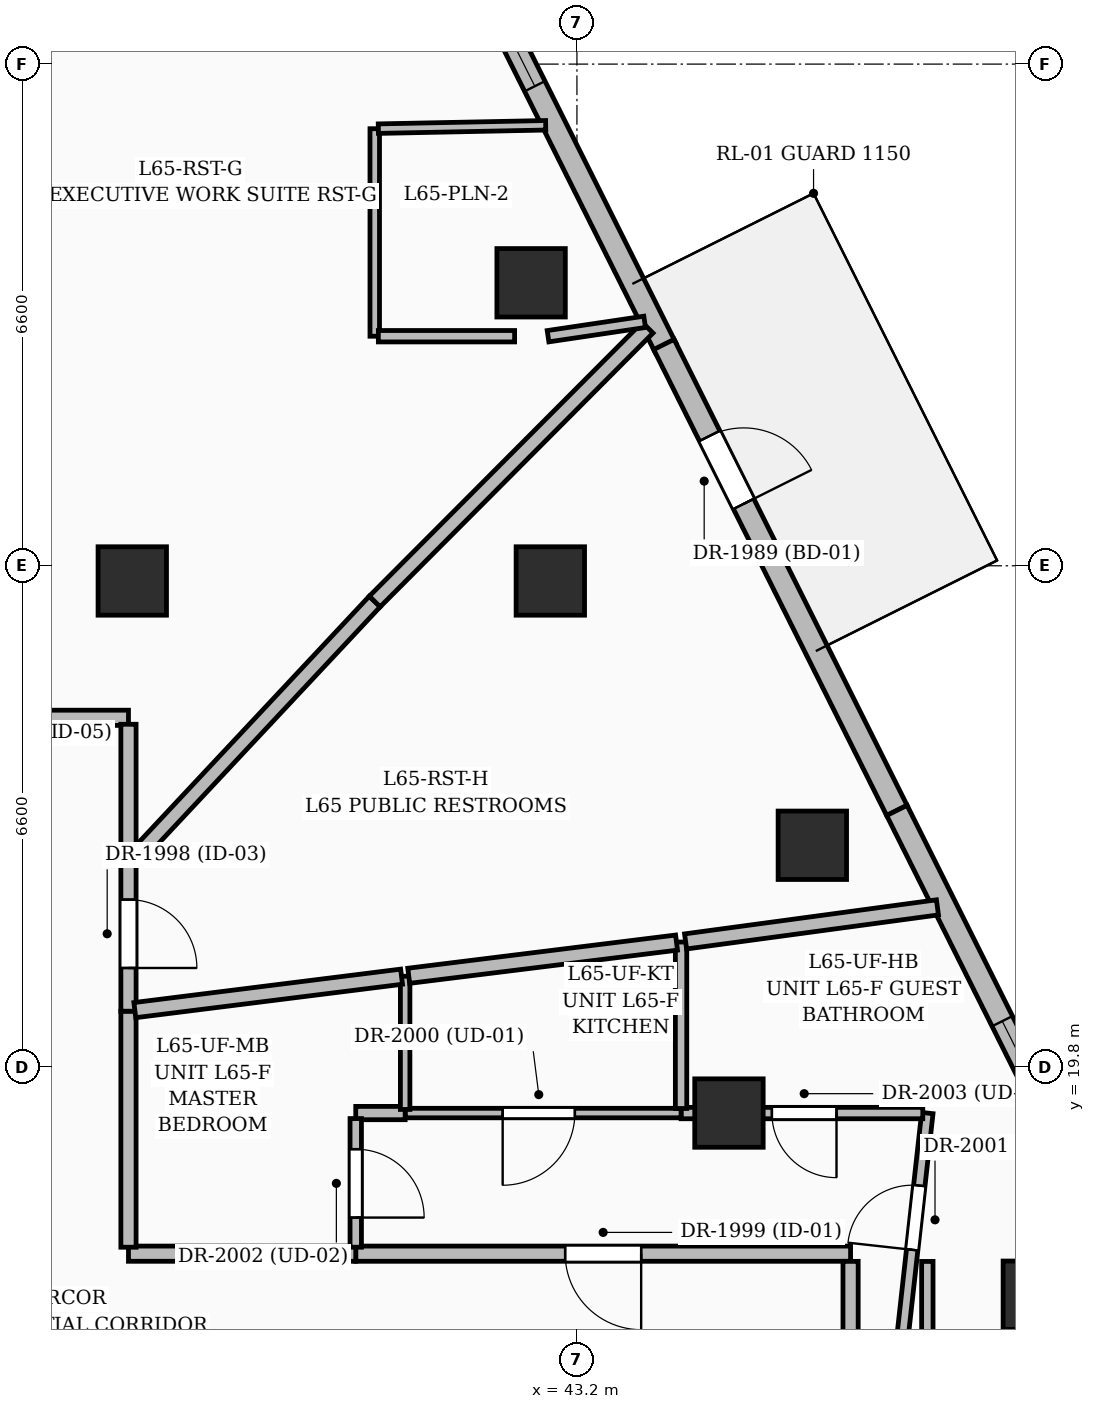
"""IFC4 building model, lengths in metres.
Left out: names, types, materials, properties, quantities, classifications, styles, units other than length and angle.
Written with IfcOpenShell. Run it as: python <this file> out.ifc"""

import sys

from ifc_helpers import new_model, si_unit, direction, frame, frame_2d, origin, origin_2d, place, context, subcontext, project, spatial, rectangle, extrude, element, fill, save


model = new_model("IFC4")
c1 = context("Model", 3, precision=1e-05, world=origin(), true_north=direction((0.0, 1.0)))
c2 = subcontext(c1, "Body", "Model", "MODEL_VIEW")
j1 = project(units=[si_unit("LENGTHUNIT", "METRE"), si_unit("PLANEANGLEUNIT", "RADIAN")], contexts=[c1])
p1 = place(None, origin())
s1 = spatial("IfcSite", under=j1, at=p1, CompositionType="ELEMENT")
p2 = place(p1, origin())
s2 = spatial("IfcBuilding", under=s1, at=p2, CompositionType="ELEMENT")
p3 = place(p2, frame((0.0, 0.0, 252.0)))
s3 = spatial("IfcBuildingStorey", under=s2, at=p3, CompositionType="ELEMENT", Elevation=252.0)
for number, where, z_axis, x_axis in (
    (1, (45.2, 19.2, 0.0), (0.0, 0.0, 1.0), (1.0, 0.0, 0.0)),
    (2, (42.85, 26.2, 0.0), (0.0, 0.0, 1.0), (1.0, 0.0, 0.0)),
    (3, (37.35, 26.2, 0.0), (0.0, 0.0, 1.0), (1.0, 0.0, 0.0)),
    (4, (49.257, 16.803, 0.0), (0.0, 0.0, 1.0), (1.0, 0.0, 0.0)),
    (5, (46.297, 22.723, 0.0), (0.0, 0.0, 1.0), (1.0, 0.0, 0.0)),
    (6, (42.597, 30.123, 0.0), (0.0, 0.0, 1.0), (1.0, 0.0, 0.0)),
):
    element("IfcColumn", number, at=place(p3, frame(where, z_axis=z_axis, x_axis=x_axis)), inside=s3, PredefinedType="COLUMN", context=c2, shape_type="SweptSolid", body=[
        extrude(rectangle(XDim=0.9, YDim=0.9, at=origin_2d()), origin(), (0.0, 0.0, 1.0), 3.75),
    ])
p4 = place(p3, frame((34.502, 31.101, 0.0), z_axis=(0.0, 0.0, 1.0), x_axis=(0.552157372899, 0.833739908816, 0.0)))
e7 = element("IfcWall", 7, at=p4, inside=s3, PredefinedType="SOLIDWALL", context=c2, shape_type="SweptSolid", body=[
    extrude(rectangle(XDim=5.234, YDim=0.3, at=frame_2d((2.617, 0.0))), origin(), (0.0, 0.0, 1.0), 3.5),
])
p5 = place(p4, frame((1.25, 0.0, 0.6)))
e8 = element("IfcOpeningElement", 8, at=p5, cuts=e7, PredefinedType="OPENING", context=c2, shape_type="SweptSolid", body=[
    extrude(rectangle(XDim=1.8, YDim=2.1, at=frame_2d((0.9, 1.05))), frame((0.0, 0.16, 0.0), z_axis=(0.0, -1.0, 0.0), x_axis=(1.0, 0.0, 0.0)), (0.0, 0.0, 1.0), 0.32),
])
p6 = place(p3, frame((41.588, 34.824, 0.0), z_axis=(0.0, 0.0, 1.0), x_axis=(0.447245016671, -0.894411479725, 0.0)))
e9 = element("IfcWall", 9, at=p6, inside=s3, PredefinedType="SOLIDWALL", context=c2, shape_type="SweptSolid", body=[
    extrude(rectangle(XDim=6.216, YDim=0.3, at=frame_2d((3.108, 0.0))), origin(), (0.0, 0.0, 1.0), 3.5),
])
p7 = place(p6, frame((0.765, 0.0, 0.55)))
e10 = element("IfcOpeningElement", 10, at=p7, cuts=e9, PredefinedType="OPENING", context=c2, shape_type="SweptSolid", body=[
    extrude(rectangle(XDim=1.6, YDim=2.2, at=frame_2d((0.8, 1.1))), frame((0.0, 0.16, 0.0), z_axis=(0.0, -1.0, 0.0), x_axis=(1.0, 0.0, 0.0)), (0.0, 0.0, 1.0), 0.32),
])
p8 = place(p3, frame((44.344, 29.312, 0.0), z_axis=(0.0, 0.0, 1.0), x_axis=(0.44722784404, -0.894420066588, 0.0)))
e11 = element("IfcWall", 11, at=p8, inside=s3, PredefinedType="SOLIDWALL", context=c2, shape_type="SweptSolid", body=[
    extrude(rectangle(XDim=6.854, YDim=0.3, at=frame_2d((3.427, 0.0))), origin(), (0.0, 0.0, 1.0), 3.5),
])
p9 = place(p8, frame((1.345, 0.0, 0.0)))
e12 = element("IfcOpeningElement", 12, at=p9, cuts=e11, PredefinedType="OPENING", context=c2, shape_type="SweptSolid", body=[
    extrude(rectangle(XDim=1.0, YDim=2.2, at=frame_2d((0.5, 1.1))), frame((0.0, 0.16, 0.0), z_axis=(0.0, -1.0, 0.0), x_axis=(1.0, 0.0, 0.0)), (0.0, 0.0, 1.0), 0.32),
])
p10 = place(p3, frame((47.409, 23.182, 0.0), z_axis=(0.0, 0.0, 1.0), x_axis=(0.447227954985, -0.894420011113, 0.0)))
e13 = element("IfcWall", 13, at=p10, inside=s3, PredefinedType="SOLIDWALL", context=c2, shape_type="SweptSolid", body=[
    extrude(rectangle(XDim=6.801, YDim=0.3, at=frame_2d((3.4, 0.0))), origin(), (0.0, 0.0, 1.0), 3.5),
])
p11 = place(p10, frame((3.1, 0.0, 0.55)))
e14 = element("IfcOpeningElement", 14, at=p11, cuts=e13, PredefinedType="OPENING", context=c2, shape_type="SweptSolid", body=[
    extrude(rectangle(XDim=1.6, YDim=2.2, at=frame_2d((0.8, 1.1))), frame((0.0, 0.16, 0.0), z_axis=(0.0, -1.0, 0.0), x_axis=(1.0, 0.0, 0.0)), (0.0, 0.0, 1.0), 0.32),
])
p12 = place(p3, frame((50.298, 17.123, 0.0), z_axis=(0.0, 0.0, 1.0), x_axis=(-0.665963458611, -0.74598436431, 0.0)))
e15 = element("IfcWall", 15, at=p12, inside=s3, PredefinedType="SOLIDWALL", context=c2, shape_type="SweptSolid", body=[
    extrude(rectangle(XDim=2.319, YDim=0.3, at=frame_2d((1.159, 0.0))), origin(), (0.0, 0.0, 1.0), 2.825),
])
p13 = place(p3, frame((46.8, 17.35, 0.0), z_axis=(0.0, 0.0, 1.0), x_axis=(-1.0, 0.0, 0.0)))
e16 = element("IfcWall", 16, at=p13, inside=s3, PredefinedType="PARTITIONING", context=c2, shape_type="SweptSolid", body=[
    extrude(rectangle(XDim=6.51, YDim=0.2, at=frame_2d((3.255, 0.0))), origin(), (0.0, 0.0, 1.0), 2.685),
])
p14 = place(p13, frame((2.755, 0.0, 0.0)))
e17 = element("IfcOpeningElement", 17, at=p14, cuts=e16, PredefinedType="OPENING", context=c2, shape_type="SweptSolid", body=[
    extrude(rectangle(XDim=1.0, YDim=2.2, at=frame_2d((0.5, 1.1))), frame((0.0, 0.11, 0.0), z_axis=(0.0, -1.0, 0.0), x_axis=(1.0, 0.0, 0.0)), (0.0, 0.0, 1.0), 0.22),
])
p15 = place(p3, frame((40.29, 17.35, 0.0), z_axis=(0.0, 0.0, 1.0), x_axis=(-1.0, 0.0, 0.0)))
e18 = element("IfcWall", 18, at=p15, inside=s3, PredefinedType="PARTITIONING", context=c2, shape_type="SweptSolid", body=[
    extrude(rectangle(XDim=2.99, YDim=0.2, at=frame_2d((1.495, 0.0))), origin(), (0.0, 0.0, 1.0), 3.5),
])
p16 = place(p3, frame((37.3, 17.435, 0.0), z_axis=(0.0, 0.0, 1.0), x_axis=(0.0, 1.0, 0.0)))
e19 = element("IfcWall", 19, at=p16, inside=s3, PredefinedType="PARTITIONING", context=c2, shape_type="SweptSolid", body=[
    extrude(rectangle(XDim=3.105, YDim=0.2, at=frame_2d((1.552, 0.0))), origin(), (0.0, 0.0, 1.0), 3.003),
])
p17 = place(p3, frame((37.3, 24.4, 0.0), z_axis=(0.0, 0.0, 1.0), x_axis=(-1.0, 0.0, 0.0)))
e20 = element("IfcWall", 20, at=p17, inside=s3, PredefinedType="PARTITIONING", context=c2, shape_type="SweptSolid", body=[
    extrude(rectangle(XDim=1.95, YDim=0.2, at=frame_2d((0.975, 0.0))), origin(), (0.0, 0.0, 1.0), 2.685),
])
p18 = place(p3, frame((37.3, 22.47, 0.0), z_axis=(0.0, 0.0, 1.0), x_axis=(0.0, -1.0, 0.0)))
e21 = element("IfcWall", 21, at=p18, inside=s3, PredefinedType="PARTITIONING", context=c2, shape_type="SweptSolid", body=[
    extrude(rectangle(XDim=1.93, YDim=0.2, at=frame_2d((0.965, 0.0))), origin(), (0.0, 0.0, 1.0), 3.5),
])
p19 = place(p18, frame((0.461, 0.0, 0.0)))
e22 = element("IfcOpeningElement", 22, at=p19, cuts=e21, PredefinedType="OPENING", context=c2, shape_type="SweptSolid", body=[
    extrude(rectangle(XDim=0.9, YDim=2.1, at=frame_2d((0.45, 1.05))), frame((0.0, 0.11, 0.0), z_axis=(0.0, -1.0, 0.0), x_axis=(1.0, 0.0, 0.0)), (0.0, 0.0, 1.0), 0.22),
])
p20 = place(p3, frame((37.3, 22.645, 0.0), z_axis=(0.0, 0.0, 1.0), x_axis=(0.0, 1.0, 0.0)))
e23 = element("IfcWall", 23, at=p20, inside=s3, PredefinedType="PARTITIONING", context=c2, shape_type="SweptSolid", body=[
    extrude(rectangle(XDim=1.67, YDim=0.2, at=frame_2d((0.835, 0.0))), origin(), (0.0, 0.0, 1.0), 3.5),
])
p21 = place(p3, frame((47.35, 15.05, 0.0), z_axis=(0.0, 0.0, 1.0), x_axis=(0.110161978568, 0.993913647395, 0.0)))
e24 = element("IfcWall", 24, at=p21, inside=s3, PredefinedType="PARTITIONING", context=c2, shape_type="SweptSolid", body=[
    extrude(rectangle(XDim=4.175, YDim=0.15, at=frame_2d((2.088, 0.0))), origin(), (0.0, 0.0, 1.0), 2.764),
])
p22 = place(p21, frame((2.365, 0.0, 0.0)))
e25 = element("IfcOpeningElement", 25, at=p22, cuts=e24, PredefinedType="OPENING", context=c2, shape_type="SweptSolid", body=[
    extrude(rectangle(XDim=0.85, YDim=2.1, at=frame_2d((0.425, 1.05))), frame((0.0, 0.085, 0.0), z_axis=(0.0, -1.0, 0.0), x_axis=(1.0, 0.0, 0.0)), (0.0, 0.0, 1.0), 0.17),
])
p23 = place(p3, frame((47.75, 19.2, 0.0), z_axis=(0.0, 0.0, 1.0), x_axis=(-1.0, 0.0, 0.0)))
e26 = element("IfcWall", 26, at=p23, inside=s3, PredefinedType="PARTITIONING", context=c2, shape_type="SweptSolid", body=[
    extrude(rectangle(XDim=3.18, YDim=0.15, at=frame_2d((1.59, 0.0))), origin(), (0.0, 0.0, 1.0), 2.82),
])
p24 = place(p23, frame((1.135, 0.0, 0.0)))
e27 = element("IfcOpeningElement", 27, at=p24, cuts=e26, PredefinedType="OPENING", context=c2, shape_type="SweptSolid", body=[
    extrude(rectangle(XDim=0.85, YDim=2.1, at=frame_2d((0.425, 1.05))), frame((0.0, 0.085, 0.0), z_axis=(0.0, -1.0, 0.0), x_axis=(1.0, 0.0, 0.0)), (0.0, 0.0, 1.0), 0.17),
])
p25 = place(p3, frame((44.57, 19.2, 0.0), z_axis=(0.0, 0.0, 1.0), x_axis=(-1.0, 0.0, 0.0)))
e28 = element("IfcWall", 28, at=p25, inside=s3, PredefinedType="PARTITIONING", context=c2, shape_type="SweptSolid", body=[
    extrude(rectangle(XDim=3.63, YDim=0.125, at=frame_2d((1.815, 0.0))), origin(), (0.0, 0.0, 1.0), 3.003),
])
p26 = place(p25, frame((1.397, 0.0, 0.0)))
e29 = element("IfcOpeningElement", 29, at=p26, cuts=e28, PredefinedType="OPENING", context=c2, shape_type="SweptSolid", body=[
    extrude(rectangle(XDim=0.95, YDim=2.2, at=frame_2d((0.475, 1.1))), frame((0.0, 0.072, 0.0), z_axis=(0.0, -1.0, 0.0), x_axis=(1.0, 0.0, 0.0)), (0.0, 0.0, 1.0), 0.145),
])
p27 = place(p3, frame((40.94, 19.2, 0.0), z_axis=(0.0, 0.0, 1.0), x_axis=(-1.0, 0.0, 0.0)))
e30 = element("IfcWall", 30, at=p27, inside=s3, PredefinedType="PARTITIONING", context=c2, shape_type="SweptSolid", body=[
    extrude(rectangle(XDim=0.65, YDim=0.175, at=frame_2d((0.325, 0.0))), origin(), (0.0, 0.0, 1.0), 3.003),
])
p28 = place(p3, frame((40.29, 19.127, 0.0), z_axis=(0.0, 0.0, 1.0), x_axis=(0.0, -1.0, 0.0)))
e31 = element("IfcWall", 31, at=p28, inside=s3, PredefinedType="PARTITIONING", context=c2, shape_type="SweptSolid", body=[
    extrude(rectangle(XDim=1.692, YDim=0.15, at=frame_2d((0.846, 0.0))), origin(), (0.0, 0.0, 1.0), 3.003),
])
p29 = place(p28, frame((0.403, 0.0, 0.0)))
e32 = element("IfcOpeningElement", 32, at=p29, cuts=e31, PredefinedType="OPENING", context=c2, shape_type="SweptSolid", body=[
    extrude(rectangle(XDim=0.9, YDim=2.15, at=frame_2d((0.45, 1.075))), frame((0.0, 0.085, 0.0), z_axis=(0.0, -1.0, 0.0), x_axis=(1.0, 0.0, 0.0)), (0.0, 0.0, 1.0), 0.17),
])
p30 = place(p3, frame((44.57, 21.45, 0.0), z_axis=(0.0, 0.0, 1.0), x_axis=(0.0, -1.0, 0.0)))
e33 = element("IfcWall", 33, at=p30, inside=s3, PredefinedType="PARTITIONING", context=c2, shape_type="SweptSolid", body=[
    extrude(rectangle(XDim=2.19, YDim=0.15, at=frame_2d((1.095, 0.0))), origin(), (0.0, 0.0, 1.0), 2.685),
])
p31 = place(p3, frame((47.943, 21.906, 0.0), z_axis=(0.0, 0.0, 1.0), x_axis=(-0.99097487628, -0.134047732473, 0.0)))
e34 = element("IfcWall", 34, at=p31, inside=s3, PredefinedType="PARTITIONING", context=c2, shape_type="SweptSolid", body=[
    extrude(rectangle(XDim=3.344, YDim=0.2, at=frame_2d((1.672, 0.0))), origin(), (0.0, 0.0, 1.0), 2.685),
])
p32 = place(p3, frame((40.94, 21.0, 0.0), z_axis=(0.0, 0.0, 1.0), x_axis=(0.0, -1.0, 0.0)))
e35 = element("IfcWall", 35, at=p32, inside=s3, PredefinedType="PARTITIONING", context=c2, shape_type="SweptSolid", body=[
    extrude(rectangle(XDim=1.752, YDim=0.125, at=frame_2d((0.876, 0.0))), origin(), (0.0, 0.0, 1.0), 3.003),
])
p33 = place(p3, frame((44.51, 21.443, 0.0), z_axis=(0.0, 0.0, 1.0), x_axis=(-0.992404306197, -0.123019075928, 0.0)))
e36 = element("IfcWall", 36, at=p33, inside=s3, PredefinedType="PARTITIONING", context=c2, shape_type="SweptSolid", body=[
    extrude(rectangle(XDim=3.55, YDim=0.2, at=frame_2d((1.775, 0.0))), origin(), (0.0, 0.0, 1.0), 2.685),
])
p34 = place(p3, frame((40.893, 20.994, 0.0), z_axis=(0.0, 0.0, 1.0), x_axis=(-0.99223214051, -0.124400077729, 0.0)))
e37 = element("IfcWall", 37, at=p34, inside=s3, PredefinedType="PARTITIONING", context=c2, shape_type="SweptSolid", body=[
    extrude(rectangle(XDim=3.537, YDim=0.2, at=frame_2d((1.768, 0.0))), origin(), (0.0, 0.0, 1.0), 3.5),
])
p35 = place(p3, frame((40.54, 25.93, 0.0), z_axis=(0.0, 0.0, 1.0), x_axis=(-0.683518835616, -0.729932874557, 0.0)))
e38 = element("IfcWall", 38, at=p35, inside=s3, PredefinedType="PARTITIONING", context=c2, shape_type="SweptSolid", body=[
    extrude(rectangle(XDim=4.655, YDim=0.2, at=frame_2d((2.328, 0.0))), origin(), (0.0, 0.0, 1.0), 3.5),
])
p36 = place(p3, frame((44.13, 29.532, 0.0), z_axis=(0.0, 0.0, 1.0), x_axis=(-0.705905569531, -0.708305955717, 0.0)))
e39 = element("IfcWall", 39, at=p36, inside=s3, PredefinedType="PARTITIONING", context=c2, shape_type="SweptSolid", body=[
    extrude(rectangle(XDim=5.085, YDim=0.2, at=frame_2d((2.543, 0.0))), origin(), (0.0, 0.0, 1.0), 2.685),
])
p37 = place(p3, frame((40.54, 29.42, 0.0), z_axis=(0.0, 0.0, 1.0), x_axis=(0.0, 1.0, 0.0)))
e40 = element("IfcWall", 40, at=p37, inside=s3, PredefinedType="PARTITIONING", context=c2, shape_type="SweptSolid", body=[
    extrude(rectangle(XDim=2.73, YDim=0.125, at=frame_2d((1.365, 0.0))), origin(), (0.0, 0.0, 1.0), 2.82),
])
p38 = place(p3, frame((42.38, 29.42, 0.0), z_axis=(0.0, 0.0, 1.0), x_axis=(-1.0, 0.0, 0.0)))
e41 = element("IfcWall", 41, at=p38, inside=s3, PredefinedType="PARTITIONING", context=c2, shape_type="SweptSolid", body=[
    extrude(rectangle(XDim=1.792, YDim=0.15, at=frame_2d((0.896, 0.0))), origin(), (0.0, 0.0, 1.0), 3.5),
])
p39 = place(p3, frame((44.091, 29.609, 0.0), z_axis=(0.0, 0.0, 1.0), x_axis=(-0.989127842111, -0.147058192431, 0.0)))
e42 = element("IfcWall", 42, at=p39, inside=s3, PredefinedType="PARTITIONING", context=c2, shape_type="SweptSolid", body=[
    extrude(rectangle(XDim=1.285, YDim=0.15, at=frame_2d((0.643, 0.0))), origin(), (0.0, 0.0, 1.0), 2.82),
])
p40 = place(p3, frame((42.789, 32.195, 0.0), z_axis=(0.0, 0.0, 1.0), x_axis=(-0.999798638934, -0.020066927661, 0.0)))
e43 = element("IfcWall", 43, at=p40, inside=s3, PredefinedType="PARTITIONING", context=c2, shape_type="SweptSolid", body=[
    extrude(rectangle(XDim=2.202, YDim=0.125, at=frame_2d((1.101, 0.0))), origin(), (0.0, 0.0, 1.0), 3.5),
])
p41 = place(p3, frame((46.8, 15.05, 0.0), z_axis=(0.0, 0.0, 1.0), x_axis=(0.0, 1.0, 0.0)))
e44 = element("IfcWall", 44, at=p41, inside=s3, PredefinedType="PARTITIONING", context=c2, shape_type="SweptSolid", body=[
    extrude(rectangle(XDim=2.199, YDim=0.2, at=frame_2d((1.1, 0.0))), origin(), (0.0, 0.0, 1.0), 2.685),
])
p42 = place(p3, frame((47.81, 17.248, 0.0), z_axis=(0.0, 0.0, 1.0), x_axis=(0.0, -1.0, 0.0)))
e45 = element("IfcWall", 45, at=p42, inside=s3, PredefinedType="PARTITIONING", context=c2, shape_type="SweptSolid", body=[
    extrude(rectangle(XDim=1.468, YDim=0.15, at=frame_2d((0.734, 0.0))), origin(), (0.0, 0.0, 1.0), 3.5),
])
p43 = place(p7, origin())
e46 = element("IfcWindow", 46, at=p43, inside=s3, PartitioningType="SINGLE_PANEL", PredefinedType="WINDOW", context=c2, shape_type="SweptSolid", body=[
    extrude(rectangle(XDim=1.6, YDim=2.2, at=frame_2d((0.8, 1.1))), frame((0.0, 0.03, 0.0), z_axis=(0.0, -1.0, 0.0), x_axis=(1.0, 0.0, 0.0)), (0.0, 0.0, 1.0), 0.06),
])
fill(e10, e46)
p44 = place(p9, origin())
e47 = element("IfcDoor", 47, at=p44, inside=s3, OperationType="SINGLE_SWING_RIGHT", PredefinedType="DOOR", context=c2, shape_type="SweptSolid", body=[
    extrude(rectangle(XDim=1.0, YDim=2.2, at=frame_2d((0.5, 1.1))), frame((0.0, 0.025, 0.0), z_axis=(0.0, -1.0, 0.0), x_axis=(1.0, 0.0, 0.0)), (0.0, 0.0, 1.0), 0.05),
])
fill(e12, e47)
p45 = place(p11, origin())
e48 = element("IfcWindow", 48, at=p45, inside=s3, PartitioningType="SINGLE_PANEL", PredefinedType="WINDOW", context=c2, shape_type="SweptSolid", body=[
    extrude(rectangle(XDim=1.6, YDim=2.2, at=frame_2d((0.8, 1.1))), frame((0.0, 0.03, 0.0), z_axis=(0.0, -1.0, 0.0), x_axis=(1.0, 0.0, 0.0)), (0.0, 0.0, 1.0), 0.06),
])
fill(e14, e48)
p46 = place(p19, origin())
e49 = element("IfcDoor", 49, at=p46, inside=s3, OperationType="SINGLE_SWING_RIGHT", PredefinedType="DOOR", context=c2, shape_type="SweptSolid", body=[
    extrude(rectangle(XDim=0.9, YDim=2.1, at=frame_2d((0.45, 1.05))), frame((0.0, 0.025, 0.0), z_axis=(0.0, -1.0, 0.0), x_axis=(1.0, 0.0, 0.0)), (0.0, 0.0, 1.0), 0.05),
])
fill(e22, e49)
p47 = place(p14, origin())
e50 = element("IfcDoor", 50, at=p47, inside=s3, OperationType="SINGLE_SWING_LEFT", PredefinedType="DOOR", context=c2, shape_type="SweptSolid", body=[
    extrude(rectangle(XDim=1.0, YDim=2.2, at=frame_2d((0.5, 1.1))), frame((0.0, 0.025, 0.0), z_axis=(0.0, -1.0, 0.0), x_axis=(1.0, 0.0, 0.0)), (0.0, 0.0, 1.0), 0.05),
])
fill(e17, e50)
p48 = place(p26, origin())
e51 = element("IfcDoor", 51, at=p48, inside=s3, OperationType="SINGLE_SWING_RIGHT", PredefinedType="DOOR", context=c2, shape_type="SweptSolid", body=[
    extrude(rectangle(XDim=0.95, YDim=2.2, at=frame_2d((0.475, 1.1))), frame((0.0, 0.025, 0.0), z_axis=(0.0, -1.0, 0.0), x_axis=(1.0, 0.0, 0.0)), (0.0, 0.0, 1.0), 0.05),
])
fill(e29, e51)
p49 = place(p22, origin())
e52 = element("IfcDoor", 52, at=p49, inside=s3, OperationType="SINGLE_SWING_LEFT", PredefinedType="DOOR", context=c2, shape_type="SweptSolid", body=[
    extrude(rectangle(XDim=0.85, YDim=2.1, at=frame_2d((0.425, 1.05))), frame((0.0, 0.025, 0.0), z_axis=(0.0, -1.0, 0.0), x_axis=(1.0, 0.0, 0.0)), (0.0, 0.0, 1.0), 0.05),
])
fill(e25, e52)
p50 = place(p29, origin())
e53 = element("IfcDoor", 53, at=p50, inside=s3, OperationType="SINGLE_SWING_RIGHT", PredefinedType="DOOR", context=c2, shape_type="SweptSolid", body=[
    extrude(rectangle(XDim=0.9, YDim=2.15, at=frame_2d((0.45, 1.075))), frame((0.0, 0.025, 0.0), z_axis=(0.0, -1.0, 0.0), x_axis=(1.0, 0.0, 0.0)), (0.0, 0.0, 1.0), 0.05),
])
fill(e32, e53)
p51 = place(p24, origin())
e54 = element("IfcDoor", 54, at=p51, inside=s3, OperationType="SINGLE_SWING_LEFT", PredefinedType="DOOR", context=c2, shape_type="SweptSolid", body=[
    extrude(rectangle(XDim=0.85, YDim=2.1, at=frame_2d((0.425, 1.05))), frame((0.0, 0.025, 0.0), z_axis=(0.0, -1.0, 0.0), x_axis=(1.0, 0.0, 0.0)), (0.0, 0.0, 1.0), 0.05),
])
fill(e27, e54)
save(model, sys.argv[1])
